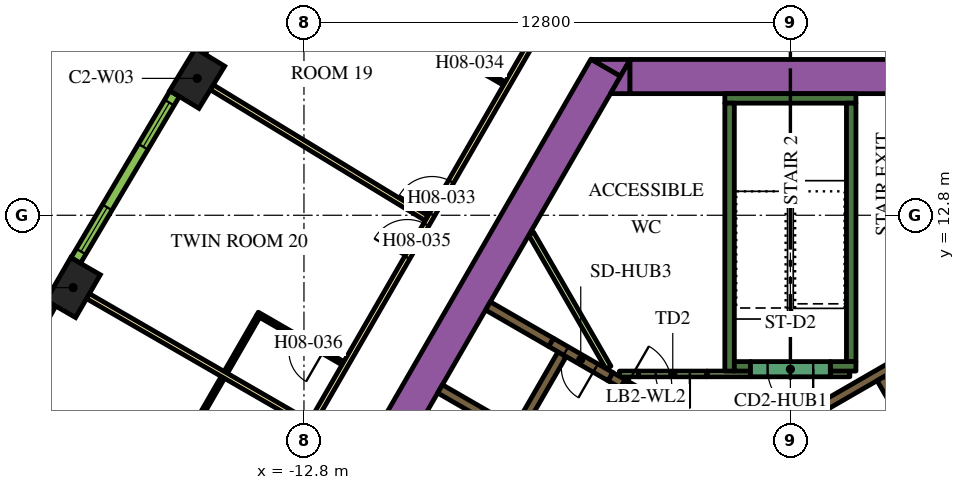
"""IFC4 building model, lengths in metres.
Left out: names, types, materials, properties, quantities, classifications, styles, units other than length and angle.
Written with IfcOpenShell. Run it as: python <this file> out.ifc"""

import sys

from ifc_helpers import new_model, si_unit, direction, frame, frame_2d, origin, origin_2d, place, context, subcontext, project, spatial, polyline, rectangle, outline, extrude, element, fill, save


model = new_model("IFC4")
c1 = context("Model", 3, precision=1e-05, world=origin(), true_north=direction((0.0, 1.0)))
c2 = subcontext(c1, "Body", "Model", "MODEL_VIEW")
j1 = project(units=[si_unit("LENGTHUNIT", "METRE"), si_unit("PLANEANGLEUNIT", "RADIAN")], contexts=[c1])
p1 = place(None, origin())
s1 = spatial("IfcSite", under=j1, at=p1, CompositionType="ELEMENT")
p2 = place(p1, origin())
s2 = spatial("IfcBuilding", under=s1, at=p2, CompositionType="ELEMENT")
p3 = place(p2, frame((0.0, 0.0, 114.9)))
s3 = spatial("IfcBuildingStorey", under=s2, at=p3, CompositionType="ELEMENT", Elevation=114.9)
for number, where, z_axis, x_axis in (
    (1, (-15.609, 16.402, 0.0), (0.0, 0.0, 1.0), (-0.52, -0.854, 0.0)),
    (2, (-18.874, 10.897, 0.0), (0.0, 0.0, 1.0), (-0.5, -0.866, 0.0)),
):
    element("IfcColumn", number, at=place(p3, frame(where, z_axis=z_axis, x_axis=x_axis)), inside=s3, PredefinedType="COLUMN", context=c2, shape_type="SweptSolid", body=[
        extrude(rectangle(XDim=1.3, YDim=0.9, at=origin_2d()), origin(), (0.0, 0.0, 1.0), 3.9),
    ])
p4 = place(p3, frame((-15.36, -1.503, 0.0), z_axis=(0.0, 0.0, 1.0), x_axis=(0.50000389221, 0.866023156604, 0.0)))
e3 = element("IfcWall", 3, at=p4, inside=s3, PredefinedType="SOLIDWALL", context=c2, shape_type="SweptSolid", body=[
    extrude(rectangle(XDim=21.0, YDim=0.9, at=frame_2d((10.5, 0.0))), origin(), (0.0, 0.0, 1.0), 3.9),
])
p5 = place(p3, origin())
e4 = element("IfcWall", 4, at=p5, inside=s3, PredefinedType="SOLIDWALL", context=c2, shape_type="SweptSolid", body=[
    extrude(outline(polyline([(-4.215, 16.9), (-4.469, 16.46), (-5.231, 16.9), (-4.215, 16.9)])), origin(), (0.0, 0.0, 1.0), 3.9),
])
p6 = place(p3, frame((-4.224, 16.45, 0.0), z_axis=(0.0, 0.0, 1.0), x_axis=(1.0, 0.0, 0.0)))
e5 = element("IfcWall", 5, at=p6, inside=s3, PredefinedType="SOLIDWALL", context=c2, shape_type="SweptSolid", body=[
    extrude(rectangle(XDim=9.488, YDim=0.9, at=frame_2d((4.744, 0.0))), origin(), (0.0, 0.0, 1.0), 3.9),
])
e6 = element("IfcWall", 6, at=p5, inside=s3, PredefinedType="SOLIDWALL", context=c2, shape_type="SweptSolid", body=[
    extrude(outline(polyline([(-4.734, 16.0), (-4.226, 16.88), (-4.226, 16.0), (-4.734, 16.0)])), origin(), (0.0, 0.0, 1.0), 3.9),
])
p7 = place(p3, frame((-1.725, 15.875, 0.0), z_axis=(0.0, 0.0, 1.0), x_axis=(1.0, 0.0, 0.0)))
e7 = element("IfcWall", 7, at=p7, inside=s3, PredefinedType="SOLIDWALL", context=c2, shape_type="SweptSolid", body=[
    extrude(rectangle(XDim=3.45, YDim=0.25, at=frame_2d((1.725, 0.0))), origin(), (0.0, 0.0, 1.0), 3.9),
])
p8 = place(p3, frame((1.6, 8.95, 0.0), z_axis=(0.0, 0.0, 1.0), x_axis=(0.0, 1.0, 0.0)))
e8 = element("IfcWall", 8, at=p8, inside=s3, PredefinedType="SOLIDWALL", context=c2, shape_type="SweptSolid", body=[
    extrude(rectangle(XDim=6.8, YDim=0.25, at=frame_2d((3.4, 0.0))), origin(), (0.0, 0.0, 1.0), 3.9),
])
p9 = place(p3, frame((1.05, 8.825, 0.0), z_axis=(0.0, 0.0, 1.0), x_axis=(1.0, 0.0, 0.0)))
e9 = element("IfcWall", 9, at=p9, inside=s3, PredefinedType="SOLIDWALL", context=c2, shape_type="SweptSolid", body=[
    extrude(rectangle(XDim=0.675, YDim=0.25, at=frame_2d((0.337, 0.0))), origin(), (0.0, 0.0, 1.0), 3.9),
])
p10 = place(p3, frame((-1.6, 8.7, 0.0), z_axis=(0.0, 0.0, 1.0), x_axis=(0.0, 1.0, 0.0)))
e10 = element("IfcWall", 10, at=p10, inside=s3, PredefinedType="SOLIDWALL", context=c2, shape_type="SweptSolid", body=[
    extrude(rectangle(XDim=7.05, YDim=0.25, at=frame_2d((3.525, 0.0))), origin(), (0.0, 0.0, 1.0), 3.9),
])
p11 = place(p3, frame((-1.475, 8.825, 0.0), z_axis=(0.0, 0.0, 1.0), x_axis=(1.0, 0.0, 0.0)))
e11 = element("IfcWall", 11, at=p11, inside=s3, PredefinedType="SOLIDWALL", context=c2, shape_type="SweptSolid", body=[
    extrude(rectangle(XDim=0.425, YDim=0.25, at=frame_2d((0.212, 0.0))), origin(), (0.0, 0.0, 1.0), 3.9),
])
e12 = element("IfcWall", 12, at=p5, inside=s3, PredefinedType="SOLIDWALL", context=c2, shape_type="SweptSolid", body=[
    extrude(outline(polyline([(2.776, 8.733), (2.499, 8.573), (2.498, 8.573), (2.498, 8.573), (2.282, 8.448), (2.282, 8.448), (0.377, 7.348), (0.16, 7.223), (0.035, 7.439), (3.032, 9.169), (3.03, 9.152), (3.03, 9.133), (3.031, 9.113), (3.035, 9.094), (3.04, 9.075), (3.047, 9.057), (3.056, 9.039), (3.119, 8.931), (2.776, 8.733)])), origin(), (0.0, 0.0, 1.0), 3.9),
])
p12 = place(p3, frame((-8.06, -1.311, 0.0), z_axis=(0.0, 0.0, 1.0), x_axis=(0.50000273126, 0.866023826885, 0.0)))
e13 = element("IfcWall", 13, at=p12, inside=s3, PredefinedType="SOLIDWALL", context=c2, shape_type="SweptSolid", body=[
    extrude(rectangle(XDim=10.33, YDim=0.25, at=frame_2d((5.165, 0.0))), origin(), (0.0, 0.0, 1.0), 3.9),
])
e14 = element("IfcWall", 14, at=p5, inside=s3, PredefinedType="SOLIDWALL", context=c2, shape_type="SweptSolid", body=[
    extrude(outline(polyline([(-3.128, 7.481), (-3.259, 7.557), (-3.134, 7.773), (-3.003, 7.698), (-3.128, 7.481)])), origin(), (0.0, 0.0, 1.0), 3.9),
])
p13 = place(p3, frame((-7.314, 7.132, 0.0), z_axis=(0.0, 0.0, 1.0), x_axis=(-0.866008176907, 0.50002983664, 0.0)))
e15 = element("IfcWall", 15, at=p13, inside=s3, PredefinedType="SOLIDWALL", context=c2, shape_type="SweptSolid", body=[
    extrude(rectangle(XDim=2.2, YDim=0.25, at=frame_2d((1.1, 0.0))), origin(), (0.0, 0.0, 1.0), 3.9),
])
p14 = place(p3, frame((-6.296, 9.455, 0.0), z_axis=(0.0, 0.0, 1.0), x_axis=(-0.866011930837, 0.500023335103, 0.0)))
e16 = element("IfcWall", 16, at=p14, inside=s3, PredefinedType="SOLIDWALL", context=c2, shape_type="SweptSolid", body=[
    extrude(rectangle(XDim=1.92, YDim=0.25, at=frame_2d((0.96, 0.0))), origin(), (0.0, 0.0, 1.0), 3.9),
])
p15 = place(p3, frame((-4.409, 8.365, 0.0), z_axis=(0.0, 0.0, 1.0), x_axis=(-0.866057014183, 0.499945245186, 0.0)))
e17 = element("IfcWall", 17, at=p15, inside=s3, PredefinedType="SOLIDWALL", context=c2, shape_type="SweptSolid", body=[
    extrude(rectangle(XDim=0.379, YDim=0.25, at=frame_2d((0.19, 0.0))), origin(), (0.0, 0.0, 1.0), 3.9),
])
p16 = place(p3, frame((-2.195, 8.625, 0.0), z_axis=(0.0, 0.0, 1.0), x_axis=(1.0, 0.0, 0.0)))
e18 = element("IfcWall", 18, at=p16, inside=s3, PredefinedType="PARTITIONING", context=c2, shape_type="SweptSolid", body=[
    extrude(rectangle(XDim=1.145, YDim=0.15, at=frame_2d((0.573, 0.0))), origin(), (0.0, 0.0, 1.0), 2.75),
])
p17 = place(p3, frame((-6.823, 12.318, 0.0), z_axis=(0.0, 0.0, 1.0), x_axis=(0.500007885066, -0.866020851292, 0.0)))
e19 = element("IfcWall", 19, at=p17, inside=s3, PredefinedType="PARTITIONING", context=c2, shape_type="SweptSolid", body=[
    extrude(rectangle(XDim=4.072, YDim=0.15, at=frame_2d((2.036, 0.0))), origin(), (0.0, 0.0, 1.0), 2.75),
])
p18 = place(p3, frame((-4.498, 8.625, 0.0), z_axis=(0.0, 0.0, 1.0), x_axis=(1.0, 0.0, 0.0)))
e20 = element("IfcWall", 20, at=p18, inside=s3, PredefinedType="PARTITIONING", context=c2, shape_type="SweptSolid", body=[
    extrude(rectangle(XDim=0.502, YDim=0.15, at=frame_2d((0.251, 0.0))), origin(), (0.0, 0.0, 1.0), 2.75),
])
p19 = place(p3, frame((1.05, 8.625, 0.0), z_axis=(0.0, 0.0, 1.0), x_axis=(1.0, 0.0, 0.0)))
e21 = element("IfcWall", 21, at=p19, inside=s3, PredefinedType="PARTITIONING", context=c2, shape_type="SweptSolid", body=[
    extrude(rectangle(XDim=0.514, YDim=0.15, at=frame_2d((0.257, 0.0))), origin(), (0.0, 0.0, 1.0), 2.75),
])
p20 = place(p3, frame((8.565, -2.185, 0.0), z_axis=(0.0, 0.0, 1.0), x_axis=(-0.499997954832, 0.866026584559, 0.0)))
e22 = element("IfcWall", 22, at=p20, inside=s3, PredefinedType="SOLIDWALL", context=c2, shape_type="SweptSolid", body=[
    extrude(rectangle(XDim=12.35, YDim=0.25, at=frame_2d((6.175, 0.0))), origin(), (0.0, 0.0, 1.0), 3.9),
])
p21 = place(p20, frame((5.725, 0.0, 0.0)))
e23 = element("IfcOpeningElement", 23, at=p21, cuts=e22, PredefinedType="OPENING", context=c2, shape_type="SweptSolid", body=[
    extrude(rectangle(XDim=0.9, YDim=2.1, at=frame_2d((0.45, 1.05))), frame((0.0, 0.135, 0.0), z_axis=(0.0, -1.0, 0.0), x_axis=(1.0, 0.0, 0.0)), (0.0, 0.0, 1.0), 0.27),
])
p22 = place(p3, frame((-6.008, 9.144, 0.0), z_axis=(0.0, 0.0, 1.0), x_axis=(-0.500006956611, -0.866021387346, 0.0)))
e24 = element("IfcWall", 24, at=p22, inside=s3, PredefinedType="SOLIDWALL", context=c2, shape_type="SweptSolid", body=[
    extrude(rectangle(XDim=9.83, YDim=0.25, at=frame_2d((4.915, 0.0))), origin(), (0.0, 0.0, 1.0), 3.9),
])
p23 = place(p22, frame((6.985, 0.0, 0.0)))
e25 = element("IfcOpeningElement", 25, at=p23, cuts=e24, PredefinedType="OPENING", context=c2, shape_type="SweptSolid", body=[
    extrude(rectangle(XDim=0.9, YDim=2.1, at=frame_2d((0.45, 1.05))), frame((0.0, 0.135, 0.0), z_axis=(0.0, -1.0, 0.0), x_axis=(1.0, 0.0, 0.0)), (0.0, 0.0, 1.0), 0.27),
])
p24 = place(p3, frame((1.05, 8.75, 0.0), z_axis=(0.0, 0.0, 1.0), x_axis=(-1.0, 0.0, 0.0)))
e26 = element("IfcWall", 26, at=p24, inside=s3, PredefinedType="SOLIDWALL", context=c2, shape_type="SweptSolid", body=[
    extrude(rectangle(XDim=2.1, YDim=0.4, at=frame_2d((1.05, 0.0))), origin(), (0.0, 0.0, 1.0), 3.9),
])
p25 = place(p24, frame((0.45, 0.0, 0.0)))
e27 = element("IfcOpeningElement", 27, at=p25, cuts=e26, PredefinedType="OPENING", context=c2, shape_type="SweptSolid", body=[
    extrude(rectangle(XDim=1.2, YDim=2.1, at=frame_2d((0.6, 1.05))), frame((0.0, 0.21, 0.0), z_axis=(0.0, -1.0, 0.0), x_axis=(1.0, 0.0, 0.0)), (0.0, 0.0, 1.0), 0.42),
])
p26 = place(p3, frame((-2.195, 8.625, 0.0), z_axis=(0.0, 0.0, 1.0), x_axis=(-1.0, 0.0, 0.0)))
e28 = element("IfcWall", 28, at=p26, inside=s3, PredefinedType="PARTITIONING", context=c2, shape_type="SweptSolid", body=[
    extrude(rectangle(XDim=1.8, YDim=0.15, at=frame_2d((0.9, 0.0))), origin(), (0.0, 0.0, 1.0), 2.75),
])
p27 = place(p26, frame((0.45, 0.0, 0.0)))
e29 = element("IfcOpeningElement", 29, at=p27, cuts=e28, PredefinedType="OPENING", context=c2, shape_type="SweptSolid", body=[
    extrude(rectangle(XDim=0.9, YDim=2.1, at=frame_2d((0.45, 1.05))), frame((0.0, 0.085, 0.0), z_axis=(0.0, -1.0, 0.0), x_axis=(1.0, 0.0, 0.0)), (0.0, 0.0, 1.0), 0.17),
])
p28 = place(p3, frame((-4.409, 8.365, 0.0), z_axis=(0.0, 0.0, 1.0), x_axis=(0.866034573852, -0.49998411664, 0.0)))
e30 = element("IfcWall", 30, at=p28, inside=s3, PredefinedType="SOLIDWALL", context=c2, shape_type="SweptSolid", body=[
    extrude(rectangle(XDim=1.4, YDim=0.25, at=frame_2d((0.7, 0.0))), origin(), (0.0, 0.0, 1.0), 3.9),
])
p29 = place(p28, frame((0.1, 0.0, 0.0)))
e31 = element("IfcOpeningElement", 31, at=p29, cuts=e30, PredefinedType="OPENING", context=c2, shape_type="SweptSolid", body=[
    extrude(rectangle(XDim=1.2, YDim=2.1, at=frame_2d((0.6, 1.05))), frame((0.0, 0.135, 0.0), z_axis=(0.0, -1.0, 0.0), x_axis=(1.0, 0.0, 0.0)), (0.0, 0.0, 1.0), 0.27),
])
p30 = place(p3, frame((-4.737, 8.555, 0.0), z_axis=(0.0, 0.0, 1.0), x_axis=(-0.865989075817, 0.500062916607, 0.0)))
e32 = element("IfcWall", 32, at=p30, inside=s3, PredefinedType="SOLIDWALL", context=c2, shape_type="SweptSolid", body=[
    extrude(rectangle(XDim=1.8, YDim=0.25, at=frame_2d((0.9, 0.0))), origin(), (0.0, 0.0, 1.0), 3.9),
])
p31 = place(p30, frame((0.45, 0.0, 0.0)))
e33 = element("IfcOpeningElement", 33, at=p31, cuts=e32, PredefinedType="OPENING", context=c2, shape_type="SweptSolid", body=[
    extrude(rectangle(XDim=0.9, YDim=2.1, at=frame_2d((0.45, 1.05))), frame((0.0, 0.135, 0.0), z_axis=(0.0, -1.0, 0.0), x_axis=(1.0, 0.0, 0.0)), (0.0, 0.0, 1.0), 0.27),
])
p32 = place(p3, frame((-19.081, -3.9, 0.0), z_axis=(0.0, 0.0, 1.0), x_axis=(0.499998313975, 0.866026377209, 0.0)))
e34 = element("IfcWall", 34, at=p32, inside=s3, PredefinedType="PARTITIONING", context=c2, shape_type="SweptSolid", body=[
    extrude(rectangle(XDim=25.766, YDim=0.15, at=frame_2d((12.883, 0.0))), origin(), (0.0, 0.0, 1.0), 2.75),
])
p33 = place(p32, frame((19.306, 0.0, 0.0)))
e35 = element("IfcOpeningElement", 35, at=p33, cuts=e34, PredefinedType="OPENING", context=c2, shape_type="SweptSolid", body=[
    extrude(rectangle(XDim=1.0, YDim=2.1, at=frame_2d((0.5, 1.05))), frame((0.0, 0.085, 0.0), z_axis=(0.0, -1.0, 0.0), x_axis=(1.0, 0.0, 0.0)), (0.0, 0.0, 1.0), 0.17),
])
p34 = place(p32, frame((18.0, 0.0, 0.0)))
e36 = element("IfcOpeningElement", 36, at=p34, cuts=e34, PredefinedType="OPENING", context=c2, shape_type="SweptSolid", body=[
    extrude(rectangle(XDim=1.0, YDim=2.1, at=frame_2d((0.5, 1.05))), frame((0.0, 0.085, 0.0), z_axis=(0.0, -1.0, 0.0), x_axis=(1.0, 0.0, 0.0)), (0.0, 0.0, 1.0), 0.17),
])
p35 = place(p32, frame((6.838, 0.0, 0.0)))
e37 = element("IfcOpeningElement", 37, at=p35, cuts=e34, PredefinedType="OPENING", context=c2, shape_type="SweptSolid", body=[
    extrude(rectangle(XDim=1.0, YDim=2.1, at=frame_2d((0.5, 1.05))), frame((0.0, 0.085, 0.0), z_axis=(0.0, -1.0, 0.0), x_axis=(1.0, 0.0, 0.0)), (0.0, 0.0, 1.0), 0.17),
])
p36 = place(p32, frame((4.674, 0.0, 0.0)))
e38 = element("IfcOpeningElement", 38, at=p36, cuts=e34, PredefinedType="OPENING", context=c2, shape_type="SweptSolid", body=[
    extrude(rectangle(XDim=0.9, YDim=2.1, at=frame_2d((0.45, 1.05))), frame((0.0, 0.085, 0.0), z_axis=(0.0, -1.0, 0.0), x_axis=(1.0, 0.0, 0.0)), (0.0, 0.0, 1.0), 0.17),
])
p37 = place(p32, frame((0.18, 0.0, 0.0)))
e39 = element("IfcOpeningElement", 39, at=p37, cuts=e34, PredefinedType="OPENING", context=c2, shape_type="SweptSolid", body=[
    extrude(rectangle(XDim=1.0, YDim=2.1, at=frame_2d((0.5, 1.05))), frame((0.0, 0.085, 0.0), z_axis=(0.0, -1.0, 0.0), x_axis=(1.0, 0.0, 0.0)), (0.0, 0.0, 1.0), 0.17),
])
p38 = place(p3, frame((-18.484, 10.672, 0.0), z_axis=(0.0, 0.0, 1.0), x_axis=(0.866019162053, -0.50001081084, 0.0)))
e40 = element("IfcWall", 40, at=p38, inside=s3, PredefinedType="PARTITIONING", context=c2, shape_type="SweptSolid", body=[
    extrude(rectangle(XDim=6.694, YDim=0.15, at=frame_2d((3.347, 0.0))), origin(), (0.0, 0.0, 1.0), 2.75),
])
p39 = place(p3, frame((-15.225, 16.167, 0.0), z_axis=(0.0, 0.0, 1.0), x_axis=(0.854088713274, -0.520127359266, 0.0)))
e41 = element("IfcWall", 41, at=p39, inside=s3, PredefinedType="PARTITIONING", context=c2, shape_type="SweptSolid", body=[
    extrude(rectangle(XDim=6.611, YDim=0.15, at=frame_2d((3.305, 0.0))), origin(), (0.0, 0.0, 1.0), 2.75),
])
p40 = place(p3, frame((-9.864, 17.615, 0.0), z_axis=(0.0, 0.0, 1.0), x_axis=(0.866019956843, -0.50000943426, 0.0)))
e42 = element("IfcWall", 42, at=p40, inside=s3, PredefinedType="PARTITIONING", context=c2, shape_type="SweptSolid", body=[
    extrude(rectangle(XDim=2.7, YDim=0.1, at=frame_2d((1.35, 0.0))), origin(), (0.0, 0.0, 1.0), 2.75),
])
p41 = place(p40, frame((1.2, 0.0, 0.0)))
e43 = element("IfcOpeningElement", 43, at=p41, cuts=e42, PredefinedType="OPENING", context=c2, shape_type="SweptSolid", body=[
    extrude(rectangle(XDim=0.9, YDim=2.1, at=frame_2d((0.45, 1.05))), frame((0.0, 0.06, 0.0), z_axis=(0.0, -1.0, 0.0), x_axis=(1.0, 0.0, 0.0)), (0.0, 0.0, 1.0), 0.12),
])
p42 = place(p3, frame((-11.774, 8.906, 0.0), z_axis=(0.0, 0.0, 1.0), x_axis=(-0.865997922154, 0.500047596559, 0.0)))
e44 = element("IfcWall", 44, at=p42, inside=s3, PredefinedType="PARTITIONING", context=c2, shape_type="SweptSolid", body=[
    extrude(rectangle(XDim=2.6, YDim=0.1, at=frame_2d((1.3, 0.0))), origin(), (0.0, 0.0, 1.0), 2.75),
])
p43 = place(p42, frame((0.6, 0.0, 0.0)))
e45 = element("IfcOpeningElement", 45, at=p43, cuts=e44, PredefinedType="OPENING", context=c2, shape_type="SweptSolid", body=[
    extrude(rectangle(XDim=0.9, YDim=2.1, at=frame_2d((0.45, 1.05))), frame((0.0, 0.06, 0.0), z_axis=(0.0, -1.0, 0.0), x_axis=(1.0, 0.0, 0.0)), (0.0, 0.0, 1.0), 0.12),
])
for number, where, z_axis, x_axis in (
    (46, (-14.008, 10.138, 0.0), (0.0, 0.0, 1.0), (-0.5, -0.866, 0.0)),
    (47, (-15.783, 7.062, 0.0), (0.0, 0.0, 1.0), (0.5, 0.866, 0.0)),
):
    element("IfcWall", number, at=place(p3, frame(where, z_axis=z_axis, x_axis=x_axis)), inside=s3, PredefinedType="PARTITIONING", context=c2, shape_type="SweptSolid", body=[
        extrude(rectangle(XDim=1.7, YDim=0.1, at=frame_2d((0.85, 0.0))), origin(), (0.0, 0.0, 1.0), 2.75),
    ])
p44 = place(p3, frame((-12.82, 21.439, 0.0), z_axis=(0.0, 0.0, 1.0), x_axis=(-0.530072082134, -0.847952585787, 0.0)))
e48 = element("IfcWall", 48, at=p44, inside=s3, PredefinedType="SOLIDWALL", context=c2, shape_type="SweptSolid", body=[
    extrude(rectangle(XDim=5.1, YDim=0.29, at=frame_2d((2.55, 0.0))), origin(), (0.0, 0.0, 1.0), 3.65),
])
p45 = place(p44, frame((0.273, 0.0, 0.9)))
e49 = element("IfcOpeningElement", 49, at=p45, cuts=e48, PredefinedType="OPENING", context=c2, shape_type="SweptSolid", body=[
    extrude(rectangle(XDim=1.35, YDim=2.15, at=frame_2d((0.675, 1.075))), frame((0.0, 0.155, 0.0), z_axis=(0.0, -1.0, 0.0), x_axis=(1.0, 0.0, 0.0)), (0.0, 0.0, 1.0), 0.31),
])
p46 = place(p44, frame((3.478, 0.0, 0.9)))
e50 = element("IfcOpeningElement", 50, at=p46, cuts=e48, PredefinedType="OPENING", context=c2, shape_type="SweptSolid", body=[
    extrude(rectangle(XDim=1.35, YDim=2.15, at=frame_2d((0.675, 1.075))), frame((0.0, 0.155, 0.0), z_axis=(0.0, -1.0, 0.0), x_axis=(1.0, 0.0, 0.0)), (0.0, 0.0, 1.0), 0.31),
])
p47 = place(p3, frame((-16.203, 15.998, 0.0), z_axis=(0.0, 0.0, 1.0), x_axis=(-0.510054281659, -0.860142214847, 0.0)))
e51 = element("IfcWall", 51, at=p47, inside=s3, PredefinedType="SOLIDWALL", context=c2, shape_type="SweptSolid", body=[
    extrude(rectangle(XDim=5.101, YDim=0.29, at=frame_2d((2.55, 0.0))), origin(), (0.0, 0.0, 1.0), 3.65),
])
p48 = place(p47, frame((0.273, 0.0, 0.9)))
e52 = element("IfcOpeningElement", 52, at=p48, cuts=e51, PredefinedType="OPENING", context=c2, shape_type="SweptSolid", body=[
    extrude(rectangle(XDim=1.35, YDim=2.15, at=frame_2d((0.675, 1.075))), frame((0.0, 0.155, 0.0), z_axis=(0.0, -1.0, 0.0), x_axis=(1.0, 0.0, 0.0)), (0.0, 0.0, 1.0), 0.31),
])
p49 = place(p47, frame((3.478, 0.0, 0.9)))
e53 = element("IfcOpeningElement", 53, at=p49, cuts=e51, PredefinedType="OPENING", context=c2, shape_type="SweptSolid", body=[
    extrude(rectangle(XDim=1.35, YDim=2.15, at=frame_2d((0.675, 1.075))), frame((0.0, 0.155, 0.0), z_axis=(0.0, -1.0, 0.0), x_axis=(1.0, 0.0, 0.0)), (0.0, 0.0, 1.0), 0.31),
])
p50 = place(p3, frame((-19.458, 10.48, 0.0), z_axis=(0.0, 0.0, 1.0), x_axis=(-0.48983164787, -0.87181704316, 0.0)))
e54 = element("IfcWall", 54, at=p50, inside=s3, PredefinedType="SOLIDWALL", context=c2, shape_type="SweptSolid", body=[
    extrude(rectangle(XDim=5.1, YDim=0.29, at=frame_2d((2.55, 0.0))), origin(), (0.0, 0.0, 1.0), 3.65),
])
p51 = place(p50, frame((0.272, 0.0, 0.9)))
e55 = element("IfcOpeningElement", 55, at=p51, cuts=e54, PredefinedType="OPENING", context=c2, shape_type="SweptSolid", body=[
    extrude(rectangle(XDim=1.35, YDim=2.15, at=frame_2d((0.675, 1.075))), frame((0.0, 0.155, 0.0), z_axis=(0.0, -1.0, 0.0), x_axis=(1.0, 0.0, 0.0)), (0.0, 0.0, 1.0), 0.31),
])
p52 = place(p50, frame((3.478, 0.0, 0.9)))
e56 = element("IfcOpeningElement", 56, at=p52, cuts=e54, PredefinedType="OPENING", context=c2, shape_type="SweptSolid", body=[
    extrude(rectangle(XDim=1.35, YDim=2.15, at=frame_2d((0.675, 1.075))), frame((0.0, 0.155, 0.0), z_axis=(0.0, -1.0, 0.0), x_axis=(1.0, 0.0, 0.0)), (0.0, 0.0, 1.0), 0.31),
])
p53 = place(p25, origin())
e57 = element("IfcDoor", 57, at=p53, inside=s3, OperationType="SINGLE_SWING_LEFT", PredefinedType="DOOR", context=c2, shape_type="SweptSolid", body=[
    extrude(rectangle(XDim=1.2, YDim=2.1, at=frame_2d((0.6, 1.05))), frame((0.0, 0.025, 0.0), z_axis=(0.0, -1.0, 0.0), x_axis=(1.0, 0.0, 0.0)), (0.0, 0.0, 1.0), 0.05),
])
fill(e27, e57)
p54 = place(p27, origin())
e58 = element("IfcDoor", 58, at=p54, inside=s3, OperationType="SINGLE_SWING_LEFT", PredefinedType="DOOR", context=c2, shape_type="SweptSolid", body=[
    extrude(rectangle(XDim=0.9, YDim=2.1, at=frame_2d((0.45, 1.05))), frame((0.0, 0.025, 0.0), z_axis=(0.0, -1.0, 0.0), x_axis=(1.0, 0.0, 0.0)), (0.0, 0.0, 1.0), 0.05),
])
fill(e29, e58)
p55 = place(p29, origin())
e59 = element("IfcDoor", 59, at=p55, inside=s3, OperationType="SINGLE_SWING_LEFT", PredefinedType="DOOR", context=c2, shape_type="SweptSolid", body=[
    extrude(rectangle(XDim=1.2, YDim=2.1, at=frame_2d((0.6, 1.05))), frame((0.0, 0.025, 0.0), z_axis=(0.0, -1.0, 0.0), x_axis=(1.0, 0.0, 0.0)), (0.0, 0.0, 1.0), 0.05),
])
fill(e31, e59)
p56 = place(p31, origin())
e60 = element("IfcDoor", 60, at=p56, inside=s3, OperationType="SINGLE_SWING_LEFT", PredefinedType="DOOR", context=c2, shape_type="SweptSolid", body=[
    extrude(rectangle(XDim=0.9, YDim=2.1, at=frame_2d((0.45, 1.05))), frame((0.0, 0.025, 0.0), z_axis=(0.0, -1.0, 0.0), x_axis=(1.0, 0.0, 0.0)), (0.0, 0.0, 1.0), 0.05),
])
fill(e33, e60)
p57 = place(p33, origin())
e61 = element("IfcDoor", 61, at=p57, inside=s3, OperationType="SINGLE_SWING_LEFT", PredefinedType="DOOR", context=c2, shape_type="SweptSolid", body=[
    extrude(rectangle(XDim=1.0, YDim=2.1, at=frame_2d((0.5, 1.05))), frame((0.0, 0.025, 0.0), z_axis=(0.0, -1.0, 0.0), x_axis=(1.0, 0.0, 0.0)), (0.0, 0.0, 1.0), 0.05),
])
fill(e35, e61)
p58 = place(p41, origin())
e62 = element("IfcDoor", 62, at=p58, inside=s3, OperationType="SINGLE_SWING_LEFT", PredefinedType="DOOR", context=c2, shape_type="SweptSolid", body=[
    extrude(rectangle(XDim=0.9, YDim=2.1, at=frame_2d((0.45, 1.05))), frame((0.0, 0.025, 0.0), z_axis=(0.0, -1.0, 0.0), x_axis=(1.0, 0.0, 0.0)), (0.0, 0.0, 1.0), 0.05),
])
fill(e43, e62)
p59 = place(p34, origin())
e63 = element("IfcDoor", 63, at=p59, inside=s3, OperationType="SINGLE_SWING_RIGHT", PredefinedType="DOOR", context=c2, shape_type="SweptSolid", body=[
    extrude(rectangle(XDim=1.0, YDim=2.1, at=frame_2d((0.5, 1.05))), frame((0.0, 0.025, 0.0), z_axis=(0.0, -1.0, 0.0), x_axis=(1.0, 0.0, 0.0)), (0.0, 0.0, 1.0), 0.05),
])
fill(e36, e63)
p60 = place(p43, origin())
e64 = element("IfcDoor", 64, at=p60, inside=s3, OperationType="SINGLE_SWING_LEFT", PredefinedType="DOOR", context=c2, shape_type="SweptSolid", body=[
    extrude(rectangle(XDim=0.9, YDim=2.1, at=frame_2d((0.45, 1.05))), frame((0.0, 0.025, 0.0), z_axis=(0.0, -1.0, 0.0), x_axis=(1.0, 0.0, 0.0)), (0.0, 0.0, 1.0), 0.05),
])
fill(e45, e64)
p61 = place(p48, origin())
e65 = element("IfcWindow", 65, at=p61, inside=s3, PartitioningType="DOUBLE_PANEL_VERTICAL", PredefinedType="WINDOW", context=c2, shape_type="SweptSolid", body=[
    extrude(rectangle(XDim=1.35, YDim=2.15, at=frame_2d((0.675, 1.075))), frame((0.0, 0.015, 0.0), z_axis=(0.0, -1.0, 0.0), x_axis=(1.0, 0.0, 0.0)), (0.0, 0.0, 1.0), 0.06),
])
fill(e52, e65)
p62 = place(p49, origin())
e66 = element("IfcWindow", 66, at=p62, inside=s3, PartitioningType="DOUBLE_PANEL_VERTICAL", PredefinedType="WINDOW", context=c2, shape_type="SweptSolid", body=[
    extrude(rectangle(XDim=1.35, YDim=2.15, at=frame_2d((0.675, 1.075))), frame((0.0, 0.015, 0.0), z_axis=(0.0, -1.0, 0.0), x_axis=(1.0, 0.0, 0.0)), (0.0, 0.0, 1.0), 0.06),
])
fill(e53, e66)
save(model, sys.argv[1])
